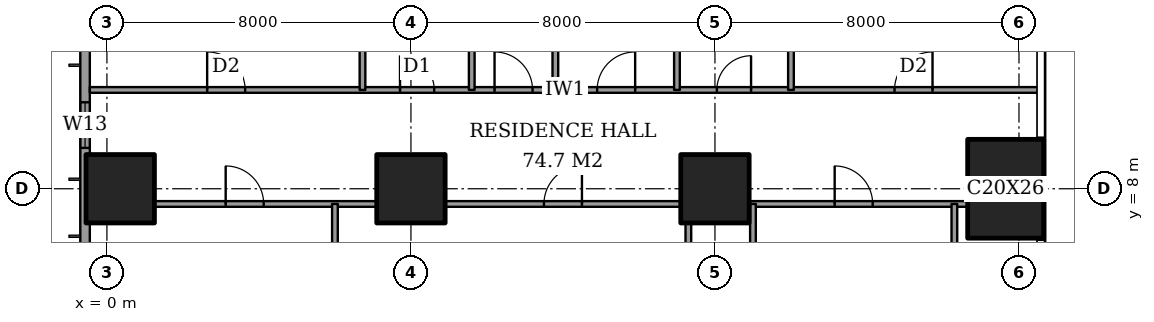
"""IFC4 building model, lengths in metres.
Left out: names, types, materials, properties, quantities, classifications, styles, units other than length and angle.
Written with IfcOpenShell. Run it as: python <this file> out.ifc"""

import sys

from ifc_helpers import new_model, si_unit, direction, frame, frame_2d, origin, origin_2d, place, context, subcontext, project, spatial, rectangle, extrude, element, fill, save


model = new_model("IFC4")
c1 = context("Model", 3, precision=1e-05, world=origin(), true_north=direction((0.0, 1.0)))
c2 = subcontext(c1, "Body", "Model", "MODEL_VIEW")
j1 = project(units=[si_unit("LENGTHUNIT", "METRE"), si_unit("PLANEANGLEUNIT", "RADIAN")], contexts=[c1])
p1 = place(None, origin())
s1 = spatial("IfcSite", under=j1, at=p1, CompositionType="ELEMENT")
p2 = place(p1, origin())
s2 = spatial("IfcBuilding", under=s1, at=p2, CompositionType="ELEMENT")
p3 = place(p2, frame((0.0, 0.0, 193.0)))
s3 = spatial("IfcBuildingStorey", under=s2, at=p3, CompositionType="ELEMENT", Elevation=193.0)
for number, where, z_axis, x_axis in (
    (1, (0.35, 8.0, 0.0), (0.0, 0.0, 1.0), (1.0, 0.0, 0.0)),
    (2, (8.0, 8.0, 0.0), (0.0, 0.0, 1.0), (1.0, 0.0, 0.0)),
    (3, (16.0, 8.0, 0.0), (0.0, 0.0, 1.0), (1.0, 0.0, 0.0)),
):
    element("IfcColumn", number, at=place(p3, frame(where, z_axis=z_axis, x_axis=x_axis)), inside=s3, PredefinedType="COLUMN", context=c2, shape_type="SweptSolid", body=[
        extrude(rectangle(XDim=1.8, YDim=1.8, at=origin_2d()), origin(), (0.0, 0.0, 1.0), 3.6),
    ])
p4 = place(p3, frame((23.65, 8.0, 0.0), z_axis=(0.0, 0.0, 1.0), x_axis=(1.0, 0.0, 0.0)))
e4 = element("IfcColumn", 4, at=p4, inside=s3, PredefinedType="COLUMN", context=c2, shape_type="SweptSolid", body=[
    extrude(rectangle(XDim=2.0, YDim=2.6, at=origin_2d()), origin(), (0.0, 0.0, 1.0), 3.6),
])
p5 = place(p3, frame((-0.575, 44.825, 0.0), z_axis=(0.0, 0.0, 1.0), x_axis=(0.0, -1.0, 0.0)))
e5 = element("IfcWall", 5, at=p5, inside=s3, PredefinedType="SOLIDWALL", context=c2, shape_type="SweptSolid", body=[
    extrude(rectangle(XDim=41.65, YDim=0.25, at=frame_2d((20.825, 0.0))), origin(), (0.0, 0.0, 1.0), 3.6),
])
p6 = place(p5, frame((0.825, 0.0, 0.2)))
e6 = element("IfcOpeningElement", 6, at=p6, cuts=e5, PredefinedType="OPENING", context=c2, shape_type="SweptSolid", body=[
    extrude(rectangle(XDim=2.4, YDim=2.4, at=frame_2d((1.2, 1.2))), frame((0.0, 0.135, 0.0), z_axis=(0.0, -1.0, 0.0), x_axis=(1.0, 0.0, 0.0)), (0.0, 0.0, 1.0), 0.27),
])
p7 = place(p5, frame((6.05, 0.0, 0.2)))
e7 = element("IfcOpeningElement", 7, at=p7, cuts=e5, PredefinedType="OPENING", context=c2, shape_type="SweptSolid", body=[
    extrude(rectangle(XDim=1.2, YDim=2.4, at=frame_2d((0.6, 1.2))), frame((0.0, 0.135, 0.0), z_axis=(0.0, -1.0, 0.0), x_axis=(1.0, 0.0, 0.0)), (0.0, 0.0, 1.0), 0.27),
])
p8 = place(p5, frame((8.225, 0.0, 0.2)))
e8 = element("IfcOpeningElement", 8, at=p8, cuts=e5, PredefinedType="OPENING", context=c2, shape_type="SweptSolid", body=[
    extrude(rectangle(XDim=2.4, YDim=2.4, at=frame_2d((1.2, 1.2))), frame((0.0, 0.135, 0.0), z_axis=(0.0, -1.0, 0.0), x_axis=(1.0, 0.0, 0.0)), (0.0, 0.0, 1.0), 0.27),
])
p9 = place(p5, frame((15.625, 0.0, 0.2)))
e9 = element("IfcOpeningElement", 9, at=p9, cuts=e5, PredefinedType="OPENING", context=c2, shape_type="SweptSolid", body=[
    extrude(rectangle(XDim=2.4, YDim=2.4, at=frame_2d((1.2, 1.2))), frame((0.0, 0.135, 0.0), z_axis=(0.0, -1.0, 0.0), x_axis=(1.0, 0.0, 0.0)), (0.0, 0.0, 1.0), 0.27),
])
p10 = place(p5, frame((23.625, 0.0, 0.2)))
e10 = element("IfcOpeningElement", 10, at=p10, cuts=e5, PredefinedType="OPENING", context=c2, shape_type="SweptSolid", body=[
    extrude(rectangle(XDim=2.4, YDim=2.4, at=frame_2d((1.2, 1.2))), frame((0.0, 0.135, 0.0), z_axis=(0.0, -1.0, 0.0), x_axis=(1.0, 0.0, 0.0)), (0.0, 0.0, 1.0), 0.27),
])
p11 = place(p5, frame((30.775, 0.0, 0.2)))
e11 = element("IfcOpeningElement", 11, at=p11, cuts=e5, PredefinedType="OPENING", context=c2, shape_type="SweptSolid", body=[
    extrude(rectangle(XDim=2.4, YDim=2.4, at=frame_2d((1.2, 1.2))), frame((0.0, 0.135, 0.0), z_axis=(0.0, -1.0, 0.0), x_axis=(1.0, 0.0, 0.0)), (0.0, 0.0, 1.0), 0.27),
])
p12 = place(p5, frame((34.55, 0.0, 0.2)))
e12 = element("IfcOpeningElement", 12, at=p12, cuts=e5, PredefinedType="OPENING", context=c2, shape_type="SweptSolid", body=[
    extrude(rectangle(XDim=1.2, YDim=2.4, at=frame_2d((0.6, 1.2))), frame((0.0, 0.135, 0.0), z_axis=(0.0, -1.0, 0.0), x_axis=(1.0, 0.0, 0.0)), (0.0, 0.0, 1.0), 0.27),
])
p13 = place(p5, frame((38.425, 0.0, 0.2)))
e13 = element("IfcOpeningElement", 13, at=p13, cuts=e5, PredefinedType="OPENING", context=c2, shape_type="SweptSolid", body=[
    extrude(rectangle(XDim=2.4, YDim=2.4, at=frame_2d((1.2, 1.2))), frame((0.0, 0.135, 0.0), z_axis=(0.0, -1.0, 0.0), x_axis=(1.0, 0.0, 0.0)), (0.0, 0.0, 1.0), 0.27),
])
p14 = place(p3, frame((1.25, 7.6, 0.0), z_axis=(0.0, 0.0, 1.0), x_axis=(1.0, 0.0, 0.0)))
e14 = element("IfcWall", 14, at=p14, inside=s3, PredefinedType="PARTITIONING", context=c2, shape_type="SweptSolid", body=[
    extrude(rectangle(XDim=5.85, YDim=0.15, at=frame_2d((2.925, 0.0))), origin(), (0.0, 0.0, 1.0), 3.35),
])
p15 = place(p14, frame((1.875, 0.0, 0.0)))
e15 = element("IfcOpeningElement", 15, at=p15, cuts=e14, PredefinedType="OPENING", context=c2, shape_type="SweptSolid", body=[
    extrude(rectangle(XDim=1.0, YDim=2.1, at=frame_2d((0.5, 1.05))), frame((0.0, 0.085, 0.0), z_axis=(0.0, -1.0, 0.0), x_axis=(1.0, 0.0, 0.0)), (0.0, 0.0, 1.0), 0.17),
])
p16 = place(p3, frame((8.9, 7.6, 0.0), z_axis=(0.0, 0.0, 1.0), x_axis=(1.0, 0.0, 0.0)))
e16 = element("IfcWall", 16, at=p16, inside=s3, PredefinedType="PARTITIONING", context=c2, shape_type="SweptSolid", body=[
    extrude(rectangle(XDim=6.2, YDim=0.15, at=frame_2d((3.1, 0.0))), origin(), (0.0, 0.0, 1.0), 3.35),
])
p17 = place(p16, frame((2.6, 0.0, 0.0)))
e17 = element("IfcOpeningElement", 17, at=p17, cuts=e16, PredefinedType="OPENING", context=c2, shape_type="SweptSolid", body=[
    extrude(rectangle(XDim=1.0, YDim=2.1, at=frame_2d((0.5, 1.05))), frame((0.0, 0.085, 0.0), z_axis=(0.0, -1.0, 0.0), x_axis=(1.0, 0.0, 0.0)), (0.0, 0.0, 1.0), 0.17),
])
p18 = place(p3, frame((16.9, 7.6, 0.0), z_axis=(0.0, 0.0, 1.0), x_axis=(1.0, 0.0, 0.0)))
e18 = element("IfcWall", 18, at=p18, inside=s3, PredefinedType="PARTITIONING", context=c2, shape_type="SweptSolid", body=[
    extrude(rectangle(XDim=5.75, YDim=0.15, at=frame_2d((2.875, 0.0))), origin(), (0.0, 0.0, 1.0), 3.35),
])
p19 = place(p18, frame((2.25, 0.0, 0.0)))
e19 = element("IfcOpeningElement", 19, at=p19, cuts=e18, PredefinedType="OPENING", context=c2, shape_type="SweptSolid", body=[
    extrude(rectangle(XDim=1.0, YDim=2.1, at=frame_2d((0.5, 1.05))), frame((0.0, 0.085, 0.0), z_axis=(0.0, -1.0, 0.0), x_axis=(1.0, 0.0, 0.0)), (0.0, 0.0, 1.0), 0.17),
])
p20 = place(p3, frame((-0.45, 10.6, 0.0), z_axis=(0.0, 0.0, 1.0), x_axis=(1.0, 0.0, 0.0)))
e20 = element("IfcWall", 20, at=p20, inside=s3, PredefinedType="PARTITIONING", context=c2, shape_type="SweptSolid", body=[
    extrude(rectangle(XDim=25.011, YDim=0.15, at=frame_2d((12.505, 0.0))), origin(), (0.0, 0.0, 1.0), 3.35),
])
p21 = place(p20, frame((10.65, 0.0, 0.0)))
e21 = element("IfcOpeningElement", 21, at=p21, cuts=e20, PredefinedType="OPENING", context=c2, shape_type="SweptSolid", body=[
    extrude(rectangle(XDim=1.0, YDim=2.1, at=frame_2d((0.5, 1.05))), frame((0.0, 0.085, 0.0), z_axis=(0.0, -1.0, 0.0), x_axis=(1.0, 0.0, 0.0)), (0.0, 0.0, 1.0), 0.17),
])
p22 = place(p20, frame((3.087, 0.0, 0.0)))
e22 = element("IfcOpeningElement", 22, at=p22, cuts=e20, PredefinedType="OPENING", context=c2, shape_type="SweptSolid", body=[
    extrude(rectangle(XDim=1.0, YDim=2.1, at=frame_2d((0.5, 1.05))), frame((0.0, 0.085, 0.0), z_axis=(0.0, -1.0, 0.0), x_axis=(1.0, 0.0, 0.0)), (0.0, 0.0, 1.0), 0.17),
])
p23 = place(p20, frame((8.163, 0.0, 0.0)))
e23 = element("IfcOpeningElement", 23, at=p23, cuts=e20, PredefinedType="OPENING", context=c2, shape_type="SweptSolid", body=[
    extrude(rectangle(XDim=0.9, YDim=2.1, at=frame_2d((0.45, 1.05))), frame((0.0, 0.085, 0.0), z_axis=(0.0, -1.0, 0.0), x_axis=(1.0, 0.0, 0.0)), (0.0, 0.0, 1.0), 0.17),
])
p24 = place(p20, frame((13.35, 0.0, 0.0)))
e24 = element("IfcOpeningElement", 24, at=p24, cuts=e20, PredefinedType="OPENING", context=c2, shape_type="SweptSolid", body=[
    extrude(rectangle(XDim=1.0, YDim=2.1, at=frame_2d((0.5, 1.05))), frame((0.0, 0.085, 0.0), z_axis=(0.0, -1.0, 0.0), x_axis=(1.0, 0.0, 0.0)), (0.0, 0.0, 1.0), 0.17),
])
p25 = place(p20, frame((16.5, 0.0, 0.0)))
e25 = element("IfcOpeningElement", 25, at=p25, cuts=e20, PredefinedType="OPENING", context=c2, shape_type="SweptSolid", body=[
    extrude(rectangle(XDim=0.9, YDim=2.1, at=frame_2d((0.45, 1.05))), frame((0.0, 0.085, 0.0), z_axis=(0.0, -1.0, 0.0), x_axis=(1.0, 0.0, 0.0)), (0.0, 0.0, 1.0), 0.17),
])
p26 = place(p20, frame((21.175, 0.0, 0.0)))
e26 = element("IfcOpeningElement", 26, at=p26, cuts=e20, PredefinedType="OPENING", context=c2, shape_type="SweptSolid", body=[
    extrude(rectangle(XDim=1.0, YDim=2.1, at=frame_2d((0.5, 1.05))), frame((0.0, 0.085, 0.0), z_axis=(0.0, -1.0, 0.0), x_axis=(1.0, 0.0, 0.0)), (0.0, 0.0, 1.0), 0.17),
])
p27 = place(p3, frame((6.0, -0.45, 0.0), z_axis=(0.0, 0.0, 1.0), x_axis=(0.0, 1.0, 0.0)))
e27 = element("IfcWall", 27, at=p27, inside=s3, PredefinedType="PARTITIONING", context=c2, shape_type="SweptSolid", body=[
    extrude(rectangle(XDim=8.05, YDim=0.15, at=frame_2d((4.025, 0.0))), origin(), (0.0, 0.0, 1.0), 3.35),
])
p28 = place(p3, frame((6.725, 10.6, 0.0), z_axis=(0.0, 0.0, 1.0), x_axis=(0.0, 1.0, 0.0)))
e28 = element("IfcWall", 28, at=p28, inside=s3, PredefinedType="PARTITIONING", context=c2, shape_type="SweptSolid", body=[
    extrude(rectangle(XDim=4.2, YDim=0.15, at=frame_2d((2.1, 0.0))), origin(), (0.0, 0.0, 1.0), 3.35),
])
p29 = place(p3, frame((9.6, 10.6, 0.0), z_axis=(0.0, 0.0, 1.0), x_axis=(0.0, 1.0, 0.0)))
e29 = element("IfcWall", 29, at=p29, inside=s3, PredefinedType="PARTITIONING", context=c2, shape_type="SweptSolid", body=[
    extrude(rectangle(XDim=11.0, YDim=0.15, at=frame_2d((5.5, 0.0))), origin(), (0.0, 0.0, 1.0), 3.35),
])
p30 = place(p29, frame((8.7, 0.0, 0.0)))
e30 = element("IfcOpeningElement", 30, at=p30, cuts=e29, PredefinedType="OPENING", context=c2, shape_type="SweptSolid", body=[
    extrude(rectangle(XDim=1.0, YDim=2.1, at=frame_2d((0.5, 1.05))), frame((0.0, 0.085, 0.0), z_axis=(0.0, -1.0, 0.0), x_axis=(1.0, 0.0, 0.0)), (0.0, 0.0, 1.0), 0.17),
])
p31 = place(p3, frame((11.8, 10.6, 0.0), z_axis=(0.0, 0.0, 1.0), x_axis=(0.0, 1.0, 0.0)))
e31 = element("IfcWall", 31, at=p31, inside=s3, PredefinedType="PARTITIONING", context=c2, shape_type="SweptSolid", body=[
    extrude(rectangle(XDim=7.4, YDim=0.15, at=frame_2d((3.7, 0.0))), origin(), (0.0, 0.0, 1.0), 3.35),
])
p32 = place(p3, frame((15.0, 10.6, 0.0), z_axis=(0.0, 0.0, 1.0), x_axis=(0.0, 1.0, 0.0)))
e32 = element("IfcWall", 32, at=p32, inside=s3, PredefinedType="PARTITIONING", context=c2, shape_type="SweptSolid", body=[
    extrude(rectangle(XDim=4.2, YDim=0.15, at=frame_2d((2.1, 0.0))), origin(), (0.0, 0.0, 1.0), 3.35),
])
p33 = place(p3, frame((15.3, 1.25, 0.0), z_axis=(0.0, 0.0, 1.0), x_axis=(0.0, 1.0, 0.0)))
e33 = element("IfcWall", 33, at=p33, inside=s3, PredefinedType="PARTITIONING", context=c2, shape_type="SweptSolid", body=[
    extrude(rectangle(XDim=5.85, YDim=0.15, at=frame_2d((2.925, 0.0))), origin(), (0.0, 0.0, 1.0), 3.35),
])
p34 = place(p33, frame((2.475, 0.0, 0.0)))
e34 = element("IfcOpeningElement", 34, at=p34, cuts=e33, PredefinedType="OPENING", context=c2, shape_type="SweptSolid", body=[
    extrude(rectangle(XDim=0.9, YDim=2.1, at=frame_2d((0.45, 1.05))), frame((0.0, 0.085, 0.0), z_axis=(0.0, -1.0, 0.0), x_axis=(1.0, 0.0, 0.0)), (0.0, 0.0, 1.0), 0.17),
])
p35 = place(p3, frame((17.0, -0.45, 0.0), z_axis=(0.0, 0.0, 1.0), x_axis=(0.0, 1.0, 0.0)))
e35 = element("IfcWall", 35, at=p35, inside=s3, PredefinedType="PARTITIONING", context=c2, shape_type="SweptSolid", body=[
    extrude(rectangle(XDim=8.05, YDim=0.15, at=frame_2d((4.025, 0.0))), origin(), (0.0, 0.0, 1.0), 3.35),
])
p36 = place(p3, frame((18.0, 10.6, 0.0), z_axis=(0.0, 0.0, 1.0), x_axis=(0.0, 1.0, 0.0)))
e36 = element("IfcWall", 36, at=p36, inside=s3, PredefinedType="PARTITIONING", context=c2, shape_type="SweptSolid", body=[
    extrude(rectangle(XDim=7.4, YDim=0.15, at=frame_2d((3.7, 0.0))), origin(), (0.0, 0.0, 1.0), 3.35),
])
p37 = place(p3, frame((22.3, -0.45, 0.0), z_axis=(0.0, 0.0, 1.0), x_axis=(0.0, 1.0, 0.0)))
e37 = element("IfcWall", 37, at=p37, inside=s3, PredefinedType="PARTITIONING", context=c2, shape_type="SweptSolid", body=[
    extrude(rectangle(XDim=8.05, YDim=0.15, at=frame_2d((4.025, 0.0))), origin(), (0.0, 0.0, 1.0), 3.35),
])
p38 = place(p37, frame((3.575, 0.0, 0.0)))
e38 = element("IfcOpeningElement", 38, at=p38, cuts=e37, PredefinedType="OPENING", context=c2, shape_type="SweptSolid", body=[
    extrude(rectangle(XDim=0.9, YDim=2.1, at=frame_2d((0.45, 1.05))), frame((0.0, 0.085, 0.0), z_axis=(0.0, -1.0, 0.0), x_axis=(1.0, 0.0, 0.0)), (0.0, 0.0, 1.0), 0.17),
])
p39 = place(p12, origin())
e39 = element("IfcWindow", 39, at=p39, inside=s3, PartitioningType="SINGLE_PANEL", PredefinedType="WINDOW", context=c2, shape_type="SweptSolid", body=[
    extrude(rectangle(XDim=1.2, YDim=2.4, at=frame_2d((0.6, 1.2))), frame((0.0, 0.03, 0.0), z_axis=(0.0, -1.0, 0.0), x_axis=(1.0, 0.0, 0.0)), (0.0, 0.0, 1.0), 0.06),
])
fill(e12, e39)
p40 = place(p15, origin())
e40 = element("IfcDoor", 40, at=p40, inside=s3, OperationType="SINGLE_SWING_RIGHT", PredefinedType="DOOR", context=c2, shape_type="SweptSolid", body=[
    extrude(rectangle(XDim=1.0, YDim=2.1, at=frame_2d((0.5, 1.05))), frame((0.0, 0.025, 0.0), z_axis=(0.0, -1.0, 0.0), x_axis=(1.0, 0.0, 0.0)), (0.0, 0.0, 1.0), 0.05),
])
fill(e15, e40)
p41 = place(p17, origin())
e41 = element("IfcDoor", 41, at=p41, inside=s3, OperationType="SINGLE_SWING_LEFT", PredefinedType="DOOR", context=c2, shape_type="SweptSolid", body=[
    extrude(rectangle(XDim=1.0, YDim=2.1, at=frame_2d((0.5, 1.05))), frame((0.0, 0.025, 0.0), z_axis=(0.0, -1.0, 0.0), x_axis=(1.0, 0.0, 0.0)), (0.0, 0.0, 1.0), 0.05),
])
fill(e17, e41)
p42 = place(p19, origin())
e42 = element("IfcDoor", 42, at=p42, inside=s3, OperationType="SINGLE_SWING_RIGHT", PredefinedType="DOOR", context=c2, shape_type="SweptSolid", body=[
    extrude(rectangle(XDim=1.0, YDim=2.1, at=frame_2d((0.5, 1.05))), frame((0.0, 0.025, 0.0), z_axis=(0.0, -1.0, 0.0), x_axis=(1.0, 0.0, 0.0)), (0.0, 0.0, 1.0), 0.05),
])
fill(e19, e42)
p43 = place(p21, origin())
e43 = element("IfcDoor", 43, at=p43, inside=s3, OperationType="SINGLE_SWING_RIGHT", PredefinedType="DOOR", context=c2, shape_type="SweptSolid", body=[
    extrude(rectangle(XDim=1.0, YDim=2.1, at=frame_2d((0.5, 1.05))), frame((0.0, 0.025, 0.0), z_axis=(0.0, -1.0, 0.0), x_axis=(1.0, 0.0, 0.0)), (0.0, 0.0, 1.0), 0.05),
])
fill(e21, e43)
p44 = place(p22, origin())
e44 = element("IfcDoor", 44, at=p44, inside=s3, OperationType="SINGLE_SWING_RIGHT", PredefinedType="DOOR", context=c2, shape_type="SweptSolid", body=[
    extrude(rectangle(XDim=1.0, YDim=2.1, at=frame_2d((0.5, 1.05))), frame((0.0, 0.025, 0.0), z_axis=(0.0, -1.0, 0.0), x_axis=(1.0, 0.0, 0.0)), (0.0, 0.0, 1.0), 0.05),
])
fill(e22, e44)
p45 = place(p23, origin())
e45 = element("IfcDoor", 45, at=p45, inside=s3, OperationType="SINGLE_SWING_RIGHT", PredefinedType="DOOR", context=c2, shape_type="SweptSolid", body=[
    extrude(rectangle(XDim=0.9, YDim=2.1, at=frame_2d((0.45, 1.05))), frame((0.0, 0.025, 0.0), z_axis=(0.0, -1.0, 0.0), x_axis=(1.0, 0.0, 0.0)), (0.0, 0.0, 1.0), 0.05),
])
fill(e23, e45)
p46 = place(p24, origin())
e46 = element("IfcDoor", 46, at=p46, inside=s3, OperationType="SINGLE_SWING_LEFT", PredefinedType="DOOR", context=c2, shape_type="SweptSolid", body=[
    extrude(rectangle(XDim=1.0, YDim=2.1, at=frame_2d((0.5, 1.05))), frame((0.0, 0.025, 0.0), z_axis=(0.0, -1.0, 0.0), x_axis=(1.0, 0.0, 0.0)), (0.0, 0.0, 1.0), 0.05),
])
fill(e24, e46)
p47 = place(p25, origin())
e47 = element("IfcDoor", 47, at=p47, inside=s3, OperationType="SINGLE_SWING_LEFT", PredefinedType="DOOR", context=c2, shape_type="SweptSolid", body=[
    extrude(rectangle(XDim=0.9, YDim=2.1, at=frame_2d((0.45, 1.05))), frame((0.0, 0.025, 0.0), z_axis=(0.0, -1.0, 0.0), x_axis=(1.0, 0.0, 0.0)), (0.0, 0.0, 1.0), 0.05),
])
fill(e25, e47)
p48 = place(p26, origin())
e48 = element("IfcDoor", 48, at=p48, inside=s3, OperationType="SINGLE_SWING_LEFT", PredefinedType="DOOR", context=c2, shape_type="SweptSolid", body=[
    extrude(rectangle(XDim=1.0, YDim=2.1, at=frame_2d((0.5, 1.05))), frame((0.0, 0.025, 0.0), z_axis=(0.0, -1.0, 0.0), x_axis=(1.0, 0.0, 0.0)), (0.0, 0.0, 1.0), 0.05),
])
fill(e26, e48)
save(model, sys.argv[1])
